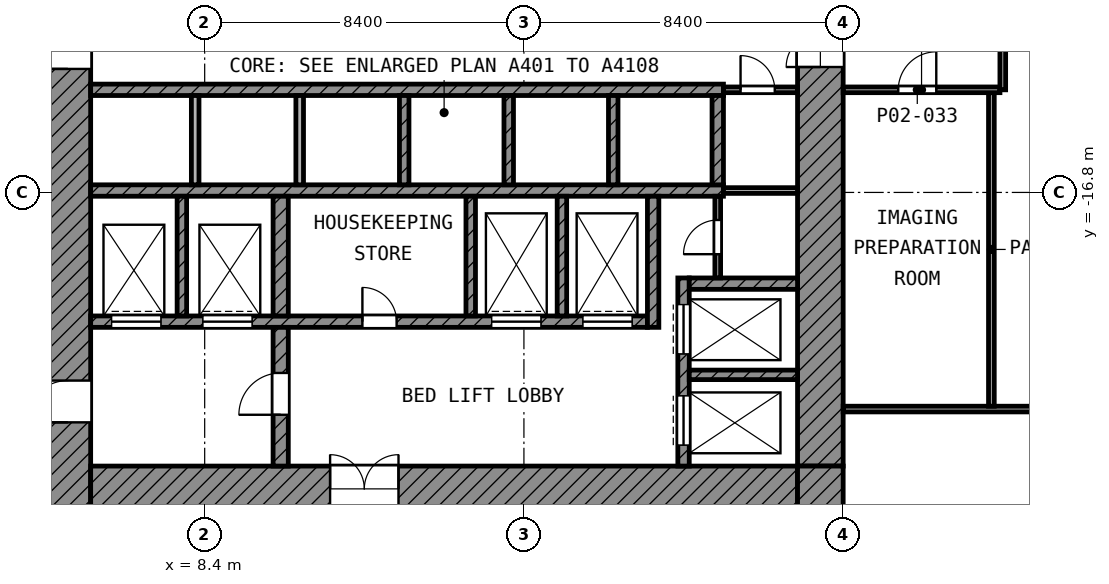
"""IFC4 building model, lengths in metres.
Left out: names, types, materials, properties, quantities, classifications, styles, units other than length and angle.
Written with IfcOpenShell. Run it as: python <this file> out.ifc"""

import sys

from ifc_helpers import new_model, si_unit, direction, frame, frame_2d, origin, place, context, subcontext, project, spatial, rectangle, extrude, element, fill, save


model = new_model("IFC4")
c1 = context("Model", 3, precision=1e-05, world=origin(), true_north=direction((0.0, 1.0)))
c2 = subcontext(c1, "Body", "Model", "MODEL_VIEW")
j1 = project(units=[si_unit("LENGTHUNIT", "METRE"), si_unit("PLANEANGLEUNIT", "RADIAN")], contexts=[c1])
p1 = place(None, origin())
s1 = spatial("IfcSite", under=j1, at=p1, CompositionType="ELEMENT")
p2 = place(p1, origin())
s2 = spatial("IfcBuilding", under=s1, at=p2, CompositionType="ELEMENT")
p3 = place(p2, frame((0.0, 0.0, 7.0)))
s3 = spatial("IfcBuildingStorey", under=s2, at=p3, CompositionType="ELEMENT", Elevation=7.0)
p4 = place(p3, frame((4.8, -25.2, 0.0), z_axis=(0.0, 0.0, 1.0), x_axis=(0.0, 1.0, 0.0)))
e1 = element("IfcWall", 1, at=p4, inside=s3, PredefinedType="SHEAR", context=c2, shape_type="SweptSolid", body=[
    extrude(rectangle(XDim=19.8, YDim=1.2, at=frame_2d((9.9, 0.0))), origin(), (0.0, 0.0, 1.0), 5.25),
])
p5 = place(p4, frame((11.65, 0.0, 0.0)))
e2 = element("IfcOpeningElement", 2, at=p5, cuts=e1, PredefinedType="OPENING", context=c2, shape_type="SweptSolid", body=[
    extrude(rectangle(XDim=1.1, YDim=2.1, at=frame_2d((0.55, 1.05))), frame((0.0, 0.61, 0.0), z_axis=(0.0, -1.0, 0.0), x_axis=(1.0, 0.0, 0.0)), (0.0, 0.0, 1.0), 1.22),
])
p6 = place(p4, frame((2.35, 0.0, 0.0)))
e3 = element("IfcOpeningElement", 3, at=p6, cuts=e1, PredefinedType="OPENING", context=c2, shape_type="SweptSolid", body=[
    extrude(rectangle(XDim=1.1, YDim=2.1, at=frame_2d((0.55, 1.05))), frame((0.0, 0.61, 0.0), z_axis=(0.0, -1.0, 0.0), x_axis=(1.0, 0.0, 0.0)), (0.0, 0.0, 1.0), 1.22),
])
p7 = place(p3, frame((24.6, -24.0, 0.0), z_axis=(0.0, 0.0, 1.0), x_axis=(0.0, 1.0, 0.0)))
e4 = element("IfcWall", 4, at=p7, inside=s3, PredefinedType="SHEAR", context=c2, shape_type="SweptSolid", body=[
    extrude(rectangle(XDim=18.6, YDim=1.2, at=frame_2d((9.3, 0.0))), origin(), (0.0, 0.0, 1.0), 5.25),
])
p8 = place(p7, frame((10.5, 0.0, 0.0)))
e5 = element("IfcOpeningElement", 5, at=p8, cuts=e4, PredefinedType="OPENING", context=c2, shape_type="SweptSolid", body=[
    extrude(rectangle(XDim=1.8, YDim=2.1, at=frame_2d((0.9, 1.05))), frame((0.0, 0.61, 0.0), z_axis=(0.0, -1.0, 0.0), x_axis=(1.0, 0.0, 0.0)), (0.0, 0.0, 1.0), 1.22),
])
p9 = place(p3, frame((5.4, -24.6, 0.0), z_axis=(0.0, 0.0, 1.0), x_axis=(1.0, 0.0, 0.0)))
e6 = element("IfcWall", 6, at=p9, inside=s3, PredefinedType="SHEAR", context=c2, shape_type="SweptSolid", body=[
    extrude(rectangle(XDim=18.6, YDim=1.2, at=frame_2d((9.3, 0.0))), origin(), (0.0, 0.0, 1.0), 5.25),
])
p10 = place(p9, frame((6.3, 0.0, 0.0)))
e7 = element("IfcOpeningElement", 7, at=p10, cuts=e6, PredefinedType="OPENING", context=c2, shape_type="SweptSolid", body=[
    extrude(rectangle(XDim=1.8, YDim=2.1, at=frame_2d((0.9, 1.05))), frame((0.0, 0.61, 0.0), z_axis=(0.0, -1.0, 0.0), x_axis=(1.0, 0.0, 0.0)), (0.0, 0.0, 1.0), 1.22),
])
p11 = place(p3, frame((24.6, -25.2, 0.0), z_axis=(0.0, 0.0, 1.0), x_axis=(0.0, 1.0, 0.0)))
e8 = element("IfcWall", 8, at=p11, inside=s3, PredefinedType="SHEAR", context=c2, shape_type="SweptSolid", body=[
    extrude(rectangle(XDim=1.2, YDim=1.2, at=frame_2d((0.6, 0.0))), origin(), (0.0, 0.0, 1.0), 5.25),
])
for number, where, z_axis, x_axis in (
    (9, (5.4, -14.1, 0.0), (0.0, 0.0, 1.0), (1.0, 0.0, 0.0)),
    (10, (5.4, -16.75, 0.0), (0.0, 0.0, 1.0), (1.0, 0.0, 0.0)),
):
    element("IfcWall", number, at=place(p3, frame(where, z_axis=z_axis, x_axis=x_axis)), inside=s3, PredefinedType="SHEAR", context=c2, shape_type="SweptSolid", body=[
        extrude(rectangle(XDim=16.65, YDim=0.3, at=frame_2d((8.325, 0.0))), origin(), (0.0, 0.0, 1.0), 5.25),
    ])
p12 = place(p3, frame((5.4, -20.2, 0.0), z_axis=(0.0, 0.0, 1.0), x_axis=(1.0, 0.0, 0.0)))
e11 = element("IfcWall", 11, at=p12, inside=s3, PredefinedType="SHEAR", context=c2, shape_type="SweptSolid", body=[
    extrude(rectangle(XDim=14.65, YDim=0.3, at=frame_2d((7.325, 0.0))), origin(), (0.0, 0.0, 1.0), 5.25),
])
p13 = place(p12, frame((10.55, 0.0, 0.0)))
e12 = element("IfcOpeningElement", 12, at=p13, cuts=e11, PredefinedType="OPENING", context=c2, shape_type="SweptSolid", body=[
    extrude(rectangle(XDim=1.3, YDim=2.1, at=frame_2d((0.65, 1.05))), frame((0.0, 0.16, 0.0), z_axis=(0.0, -1.0, 0.0), x_axis=(1.0, 0.0, 0.0)), (0.0, 0.0, 1.0), 0.32),
])
p14 = place(p12, frame((12.95, 0.0, 0.0)))
e13 = element("IfcOpeningElement", 13, at=p14, cuts=e11, PredefinedType="OPENING", context=c2, shape_type="SweptSolid", body=[
    extrude(rectangle(XDim=1.3, YDim=2.1, at=frame_2d((0.65, 1.05))), frame((0.0, 0.16, 0.0), z_axis=(0.0, -1.0, 0.0), x_axis=(1.0, 0.0, 0.0)), (0.0, 0.0, 1.0), 0.32),
])
p15 = place(p12, frame((0.55, 0.0, 0.0)))
e14 = element("IfcOpeningElement", 14, at=p15, cuts=e11, PredefinedType="OPENING", context=c2, shape_type="SweptSolid", body=[
    extrude(rectangle(XDim=1.3, YDim=2.1, at=frame_2d((0.65, 1.05))), frame((0.0, 0.16, 0.0), z_axis=(0.0, -1.0, 0.0), x_axis=(1.0, 0.0, 0.0)), (0.0, 0.0, 1.0), 0.32),
])
p16 = place(p12, frame((2.95, 0.0, 0.0)))
e15 = element("IfcOpeningElement", 15, at=p16, cuts=e11, PredefinedType="OPENING", context=c2, shape_type="SweptSolid", body=[
    extrude(rectangle(XDim=1.3, YDim=2.1, at=frame_2d((0.65, 1.05))), frame((0.0, 0.16, 0.0), z_axis=(0.0, -1.0, 0.0), x_axis=(1.0, 0.0, 0.0)), (0.0, 0.0, 1.0), 0.32),
])
p17 = place(p12, frame((7.15, 0.0, 0.0)))
e16 = element("IfcOpeningElement", 16, at=p17, cuts=e11, PredefinedType="OPENING", context=c2, shape_type="SweptSolid", body=[
    extrude(rectangle(XDim=0.9, YDim=2.1, at=frame_2d((0.45, 1.05))), frame((0.0, 0.16, 0.0), z_axis=(0.0, -1.0, 0.0), x_axis=(1.0, 0.0, 0.0)), (0.0, 0.0, 1.0), 0.32),
])
p18 = place(p3, frame((10.4, -24.0, 0.0), z_axis=(0.0, 0.0, 1.0), x_axis=(0.0, 1.0, 0.0)))
e17 = element("IfcWall", 17, at=p18, inside=s3, PredefinedType="SHEAR", context=c2, shape_type="SweptSolid", body=[
    extrude(rectangle(XDim=3.65, YDim=0.4, at=frame_2d((1.825, 0.0))), origin(), (0.0, 0.0, 1.0), 5.25),
])
p19 = place(p18, frame((1.35, 0.0, 0.0)))
e18 = element("IfcOpeningElement", 18, at=p19, cuts=e17, PredefinedType="OPENING", context=c2, shape_type="SweptSolid", body=[
    extrude(rectangle(XDim=1.1, YDim=2.1, at=frame_2d((0.55, 1.05))), frame((0.0, 0.21, 0.0), z_axis=(0.0, -1.0, 0.0), x_axis=(1.0, 0.0, 0.0)), (0.0, 0.0, 1.0), 0.42),
])
p20 = place(p3, frame((10.4, -20.05, 0.0), z_axis=(0.0, 0.0, 1.0), x_axis=(0.0, 1.0, 0.0)))
e19 = element("IfcWall", 19, at=p20, inside=s3, PredefinedType="SHEAR", context=c2, shape_type="SweptSolid", body=[
    extrude(rectangle(XDim=3.15, YDim=0.4, at=frame_2d((1.575, 0.0))), origin(), (0.0, 0.0, 1.0), 5.25),
])
p21 = place(p3, frame((20.2, -20.35, 0.0), z_axis=(0.0, 0.0, 1.0), x_axis=(0.0, 1.0, 0.0)))
e20 = element("IfcWall", 20, at=p21, inside=s3, PredefinedType="SHEAR", context=c2, shape_type="SweptSolid", body=[
    extrude(rectangle(XDim=3.45, YDim=0.3, at=frame_2d((1.725, 0.0))), origin(), (0.0, 0.0, 1.0), 5.25),
])
p22 = place(p3, frame((21.9, -16.6, 0.0), z_axis=(0.0, 0.0, 1.0), x_axis=(0.0, 1.0, 0.0)))
e21 = element("IfcWall", 21, at=p22, inside=s3, PredefinedType="SHEAR", context=c2, shape_type="SweptSolid", body=[
    extrude(rectangle(XDim=2.35, YDim=0.3, at=frame_2d((1.175, 0.0))), origin(), (0.0, 0.0, 1.0), 5.25),
])
p23 = place(p3, frame((21.15, -19.2, 0.0), z_axis=(0.0, 0.0, 1.0), x_axis=(1.0, 0.0, 0.0)))
e22 = element("IfcWall", 22, at=p23, inside=s3, PredefinedType="SHEAR", context=c2, shape_type="SweptSolid", body=[
    extrude(rectangle(XDim=2.85, YDim=0.3, at=frame_2d((1.425, 0.0))), origin(), (0.0, 0.0, 1.0), 5.25),
])
p24 = place(p3, frame((21.0, -24.0, 0.0), z_axis=(0.0, 0.0, 1.0), x_axis=(0.0, 1.0, 0.0)))
e23 = element("IfcWall", 23, at=p24, inside=s3, PredefinedType="SHEAR", context=c2, shape_type="SweptSolid", body=[
    extrude(rectangle(XDim=4.95, YDim=0.3, at=frame_2d((2.475, 0.0))), origin(), (0.0, 0.0, 1.0), 5.25),
])
p25 = place(p24, frame((2.95, 0.0, 0.0)))
e24 = element("IfcOpeningElement", 24, at=p25, cuts=e23, PredefinedType="OPENING", context=c2, shape_type="SweptSolid", body=[
    extrude(rectangle(XDim=1.3, YDim=2.1, at=frame_2d((0.65, 1.05))), frame((0.0, 0.16, 0.0), z_axis=(0.0, -1.0, 0.0), x_axis=(1.0, 0.0, 0.0)), (0.0, 0.0, 1.0), 0.32),
])
p26 = place(p24, frame((0.55, 0.0, 0.0)))
e25 = element("IfcOpeningElement", 25, at=p26, cuts=e23, PredefinedType="OPENING", context=c2, shape_type="SweptSolid", body=[
    extrude(rectangle(XDim=1.3, YDim=2.1, at=frame_2d((0.65, 1.05))), frame((0.0, 0.16, 0.0), z_axis=(0.0, -1.0, 0.0), x_axis=(1.0, 0.0, 0.0)), (0.0, 0.0, 1.0), 0.32),
])
p27 = place(p3, frame((21.15, -21.6, 0.0), z_axis=(0.0, 0.0, 1.0), x_axis=(1.0, 0.0, 0.0)))
e26 = element("IfcWall", 26, at=p27, inside=s3, PredefinedType="SHEAR", context=c2, shape_type="SweptSolid", body=[
    extrude(rectangle(XDim=2.85, YDim=0.25, at=frame_2d((1.425, 0.0))), origin(), (0.0, 0.0, 1.0), 5.25),
])
for number, where, z_axis, x_axis in (
    (27, (7.8, -20.05, 0.0), (0.0, 0.0, 1.0), (0.0, 1.0, 0.0)),
    (28, (15.4, -20.05, 0.0), (0.0, 0.0, 1.0), (0.0, 1.0, 0.0)),
    (29, (17.8, -20.05, 0.0), (0.0, 0.0, 1.0), (0.0, 1.0, 0.0)),
):
    element("IfcWall", number, at=place(p3, frame(where, z_axis=z_axis, x_axis=x_axis)), inside=s3, PredefinedType="SHEAR", context=c2, shape_type="SweptSolid", body=[
        extrude(rectangle(XDim=3.15, YDim=0.25, at=frame_2d((1.575, 0.0))), origin(), (0.0, 0.0, 1.0), 5.25),
    ])
for number, where, z_axis, x_axis in (
    (30, (8.15, -16.6, 0.0), (0.0, 0.0, 1.0), (0.0, 1.0, 0.0)),
    (31, (10.9, -16.6, 0.0), (0.0, 0.0, 1.0), (0.0, 1.0, 0.0)),
):
    element("IfcWall", number, at=place(p3, frame(where, z_axis=z_axis, x_axis=x_axis)), inside=s3, PredefinedType="PARTITIONING", context=c2, shape_type="SweptSolid", body=[
        extrude(rectangle(XDim=2.35, YDim=0.2, at=frame_2d((1.175, 0.0))), origin(), (0.0, 0.0, 1.0), 5.25),
    ])
for number, where, z_axis, x_axis in (
    (32, (13.65, -16.6, 0.0), (0.0, 0.0, 1.0), (0.0, 1.0, 0.0)),
    (33, (16.4, -16.6, 0.0), (0.0, 0.0, 1.0), (0.0, 1.0, 0.0)),
    (34, (19.15, -16.6, 0.0), (0.0, 0.0, 1.0), (0.0, 1.0, 0.0)),
):
    element("IfcWall", number, at=place(p3, frame(where, z_axis=z_axis, x_axis=x_axis)), inside=s3, PredefinedType="SHEAR", context=c2, shape_type="SweptSolid", body=[
        extrude(rectangle(XDim=2.35, YDim=0.25, at=frame_2d((1.175, 0.0))), origin(), (0.0, 0.0, 1.0), 5.25),
    ])
p28 = place(p3, frame((21.9, -19.05, 0.0), z_axis=(0.0, 0.0, 1.0), x_axis=(0.0, 1.0, 0.0)))
e35 = element("IfcWall", 35, at=p28, inside=s3, PredefinedType="PARTITIONING", context=c2, shape_type="SweptSolid", body=[
    extrude(rectangle(XDim=2.15, YDim=0.15, at=frame_2d((1.075, 0.0))), origin(), (0.0, 0.0, 1.0), 5.25),
])
p29 = place(p28, frame((0.625, 0.0, 0.0)))
e36 = element("IfcOpeningElement", 36, at=p29, cuts=e35, PredefinedType="OPENING", context=c2, shape_type="SweptSolid", body=[
    extrude(rectangle(XDim=0.9, YDim=2.1, at=frame_2d((0.45, 1.05))), frame((0.0, 0.085, 0.0), z_axis=(0.0, -1.0, 0.0), x_axis=(1.0, 0.0, 0.0)), (0.0, 0.0, 1.0), 0.17),
])
p30 = place(p3, frame((22.05, -16.75, 0.0), z_axis=(0.0, 0.0, 1.0), x_axis=(1.0, 0.0, 0.0)))
e37 = element("IfcWall", 37, at=p30, inside=s3, PredefinedType="PARTITIONING", context=c2, shape_type="SweptSolid", body=[
    extrude(rectangle(XDim=1.95, YDim=0.15, at=frame_2d((0.975, 0.0))), origin(), (0.0, 0.0, 1.0), 5.25),
])
p31 = place(p3, frame((22.05, -14.1, 0.0), z_axis=(0.0, 0.0, 1.0), x_axis=(1.0, 0.0, 0.0)))
e38 = element("IfcWall", 38, at=p31, inside=s3, PredefinedType="PARTITIONING", context=c2, shape_type="SweptSolid", body=[
    extrude(rectangle(XDim=1.95, YDim=0.15, at=frame_2d((0.975, 0.0))), origin(), (0.0, 0.0, 1.0), 5.25),
])
p32 = place(p31, frame((0.45, 0.0, 0.0)))
e39 = element("IfcOpeningElement", 39, at=p32, cuts=e38, PredefinedType="OPENING", context=c2, shape_type="SweptSolid", body=[
    extrude(rectangle(XDim=0.9, YDim=2.1, at=frame_2d((0.45, 1.05))), frame((0.0, 0.085, 0.0), z_axis=(0.0, -1.0, 0.0), x_axis=(1.0, 0.0, 0.0)), (0.0, 0.0, 1.0), 0.17),
])
p33 = place(p3, frame((25.2, -22.5, 0.0), z_axis=(0.0, 0.0, 1.0), x_axis=(1.0, 0.0, 0.0)))
e40 = element("IfcWall", 40, at=p33, inside=s3, PredefinedType="PARTITIONING", context=c2, shape_type="SweptSolid", body=[
    extrude(rectangle(XDim=29.625, YDim=0.15, at=frame_2d((14.812, 0.0))), origin(), (0.0, 0.0, 1.0), 5.25),
])
p34 = place(p33, frame((5.65, 0.0, 0.0)))
e41 = element("IfcOpeningElement", 41, at=p34, cuts=e40, PredefinedType="OPENING", context=c2, shape_type="SweptSolid", body=[
    extrude(rectangle(XDim=1.0, YDim=2.1, at=frame_2d((0.5, 1.05))), frame((0.0, 0.085, 0.0), z_axis=(0.0, -1.0, 0.0), x_axis=(1.0, 0.0, 0.0)), (0.0, 0.0, 1.0), 0.17),
])
p35 = place(p33, frame((10.45, 0.0, 0.0)))
e42 = element("IfcOpeningElement", 42, at=p35, cuts=e40, PredefinedType="OPENING", context=c2, shape_type="SweptSolid", body=[
    extrude(rectangle(XDim=1.5, YDim=2.1, at=frame_2d((0.75, 1.05))), frame((0.0, 0.085, 0.0), z_axis=(0.0, -1.0, 0.0), x_axis=(1.0, 0.0, 0.0)), (0.0, 0.0, 1.0), 0.17),
])
p36 = place(p33, frame((13.25, 0.0, 0.0)))
e43 = element("IfcOpeningElement", 43, at=p36, cuts=e40, PredefinedType="OPENING", context=c2, shape_type="SweptSolid", body=[
    extrude(rectangle(XDim=1.5, YDim=2.1, at=frame_2d((0.75, 1.05))), frame((0.0, 0.085, 0.0), z_axis=(0.0, -1.0, 0.0), x_axis=(1.0, 0.0, 0.0)), (0.0, 0.0, 1.0), 0.17),
])
p37 = place(p3, frame((25.2, -14.1, 0.0), z_axis=(0.0, 0.0, 1.0), x_axis=(1.0, 0.0, 0.0)))
e44 = element("IfcWall", 44, at=p37, inside=s3, PredefinedType="PARTITIONING", context=c2, shape_type="SweptSolid", body=[
    extrude(rectangle(XDim=4.125, YDim=0.15, at=frame_2d((2.062, 0.0))), origin(), (0.0, 0.0, 1.0), 5.25),
])
p38 = place(p37, frame((1.45, 0.0, 0.0)))
e45 = element("IfcOpeningElement", 45, at=p38, cuts=e44, PredefinedType="OPENING", context=c2, shape_type="SweptSolid", body=[
    extrude(rectangle(XDim=1.0, YDim=2.1, at=frame_2d((0.5, 1.05))), frame((0.0, 0.085, 0.0), z_axis=(0.0, -1.0, 0.0), x_axis=(1.0, 0.0, 0.0)), (0.0, 0.0, 1.0), 0.17),
])
p39 = place(p3, frame((29.1, -22.425, 0.0), z_axis=(0.0, 0.0, 1.0), x_axis=(0.0, 1.0, 0.0)))
e46 = element("IfcWall", 46, at=p39, inside=s3, PredefinedType="PARTITIONING", context=c2, shape_type="SweptSolid", body=[
    extrude(rectangle(XDim=8.25, YDim=0.15, at=frame_2d((4.125, 0.0))), origin(), (0.0, 0.0, 1.0), 5.25),
])
p40 = place(p3, frame((29.4, -14.1, 0.0), z_axis=(0.0, 0.0, 1.0), x_axis=(0.0, 1.0, 0.0)))
e47 = element("IfcWall", 47, at=p40, inside=s3, PredefinedType="PARTITIONING", context=c2, shape_type="SweptSolid", body=[
    extrude(rectangle(XDim=3.0, YDim=0.15, at=frame_2d((1.5, 0.0))), origin(), (0.0, 0.0, 1.0), 5.25),
])
p41 = place(p25, origin())
e48 = element("IfcDoor", 48, at=p41, inside=s3, OperationType="DOUBLE_DOOR_SLIDING", PredefinedType="DOOR", context=c2, shape_type="SweptSolid", body=[
    extrude(rectangle(XDim=1.3, YDim=2.1, at=frame_2d((0.65, 1.05))), frame((0.0, 0.025, 0.0), z_axis=(0.0, -1.0, 0.0), x_axis=(1.0, 0.0, 0.0)), (0.0, 0.0, 1.0), 0.05),
])
fill(e24, e48)
p42 = place(p26, origin())
e49 = element("IfcDoor", 49, at=p42, inside=s3, OperationType="DOUBLE_DOOR_SLIDING", PredefinedType="DOOR", context=c2, shape_type="SweptSolid", body=[
    extrude(rectangle(XDim=1.3, YDim=2.1, at=frame_2d((0.65, 1.05))), frame((0.0, 0.025, 0.0), z_axis=(0.0, -1.0, 0.0), x_axis=(1.0, 0.0, 0.0)), (0.0, 0.0, 1.0), 0.05),
])
fill(e25, e49)
p43 = place(p13, origin())
e50 = element("IfcDoor", 50, at=p43, inside=s3, OperationType="DOUBLE_DOOR_SLIDING", PredefinedType="DOOR", context=c2, shape_type="SweptSolid", body=[
    extrude(rectangle(XDim=1.3, YDim=2.1, at=frame_2d((0.65, 1.05))), frame((0.0, 0.025, 0.0), z_axis=(0.0, -1.0, 0.0), x_axis=(1.0, 0.0, 0.0)), (0.0, 0.0, 1.0), 0.05),
])
fill(e12, e50)
p44 = place(p14, origin())
e51 = element("IfcDoor", 51, at=p44, inside=s3, OperationType="DOUBLE_DOOR_SLIDING", PredefinedType="DOOR", context=c2, shape_type="SweptSolid", body=[
    extrude(rectangle(XDim=1.3, YDim=2.1, at=frame_2d((0.65, 1.05))), frame((0.0, 0.025, 0.0), z_axis=(0.0, -1.0, 0.0), x_axis=(1.0, 0.0, 0.0)), (0.0, 0.0, 1.0), 0.05),
])
fill(e13, e51)
p45 = place(p15, origin())
e52 = element("IfcDoor", 52, at=p45, inside=s3, OperationType="DOUBLE_DOOR_SLIDING", PredefinedType="DOOR", context=c2, shape_type="SweptSolid", body=[
    extrude(rectangle(XDim=1.3, YDim=2.1, at=frame_2d((0.65, 1.05))), frame((0.0, 0.025, 0.0), z_axis=(0.0, -1.0, 0.0), x_axis=(1.0, 0.0, 0.0)), (0.0, 0.0, 1.0), 0.05),
])
fill(e14, e52)
p46 = place(p16, origin())
e53 = element("IfcDoor", 53, at=p46, inside=s3, OperationType="DOUBLE_DOOR_SLIDING", PredefinedType="DOOR", context=c2, shape_type="SweptSolid", body=[
    extrude(rectangle(XDim=1.3, YDim=2.1, at=frame_2d((0.65, 1.05))), frame((0.0, 0.025, 0.0), z_axis=(0.0, -1.0, 0.0), x_axis=(1.0, 0.0, 0.0)), (0.0, 0.0, 1.0), 0.05),
])
fill(e15, e53)
p47 = place(p5, origin())
e54 = element("IfcDoor", 54, at=p47, inside=s3, OperationType="SINGLE_SWING_LEFT", PredefinedType="DOOR", context=c2, shape_type="SweptSolid", body=[
    extrude(rectangle(XDim=1.1, YDim=2.1, at=frame_2d((0.55, 1.05))), frame((0.0, 0.025, 0.0), z_axis=(0.0, -1.0, 0.0), x_axis=(1.0, 0.0, 0.0)), (0.0, 0.0, 1.0), 0.05),
])
fill(e2, e54)
p48 = place(p6, origin())
e55 = element("IfcDoor", 55, at=p48, inside=s3, OperationType="SINGLE_SWING_LEFT", PredefinedType="DOOR", context=c2, shape_type="SweptSolid", body=[
    extrude(rectangle(XDim=1.1, YDim=2.1, at=frame_2d((0.55, 1.05))), frame((0.0, 0.025, 0.0), z_axis=(0.0, -1.0, 0.0), x_axis=(1.0, 0.0, 0.0)), (0.0, 0.0, 1.0), 0.05),
])
fill(e3, e55)
p49 = place(p19, origin())
e56 = element("IfcDoor", 56, at=p49, inside=s3, OperationType="SINGLE_SWING_LEFT", PredefinedType="DOOR", context=c2, shape_type="SweptSolid", body=[
    extrude(rectangle(XDim=1.1, YDim=2.1, at=frame_2d((0.55, 1.05))), frame((0.0, 0.025, 0.0), z_axis=(0.0, -1.0, 0.0), x_axis=(1.0, 0.0, 0.0)), (0.0, 0.0, 1.0), 0.05),
])
fill(e18, e56)
p50 = place(p8, origin())
e57 = element("IfcDoor", 57, at=p50, inside=s3, OperationType="DOUBLE_DOOR_SINGLE_SWING", PredefinedType="DOOR", context=c2, shape_type="SweptSolid", body=[
    extrude(rectangle(XDim=1.8, YDim=2.1, at=frame_2d((0.9, 1.05))), frame((0.0, 0.025, 0.0), z_axis=(0.0, -1.0, 0.0), x_axis=(1.0, 0.0, 0.0)), (0.0, 0.0, 1.0), 0.05),
])
fill(e5, e57)
p51 = place(p10, origin())
e58 = element("IfcDoor", 58, at=p51, inside=s3, OperationType="DOUBLE_DOOR_SINGLE_SWING", PredefinedType="DOOR", context=c2, shape_type="SweptSolid", body=[
    extrude(rectangle(XDim=1.8, YDim=2.1, at=frame_2d((0.9, 1.05))), frame((0.0, 0.025, 0.0), z_axis=(0.0, -1.0, 0.0), x_axis=(1.0, 0.0, 0.0)), (0.0, 0.0, 1.0), 0.05),
])
fill(e7, e58)
p52 = place(p32, origin())
e59 = element("IfcDoor", 59, at=p52, inside=s3, OperationType="SINGLE_SWING_LEFT", PredefinedType="DOOR", context=c2, shape_type="SweptSolid", body=[
    extrude(rectangle(XDim=0.9, YDim=2.1, at=frame_2d((0.45, 1.05))), frame((0.0, 0.025, 0.0), z_axis=(0.0, -1.0, 0.0), x_axis=(1.0, 0.0, 0.0)), (0.0, 0.0, 1.0), 0.05),
])
fill(e39, e59)
p53 = place(p29, origin())
e60 = element("IfcDoor", 60, at=p53, inside=s3, OperationType="SINGLE_SWING_LEFT", PredefinedType="DOOR", context=c2, shape_type="SweptSolid", body=[
    extrude(rectangle(XDim=0.9, YDim=2.1, at=frame_2d((0.45, 1.05))), frame((0.0, 0.025, 0.0), z_axis=(0.0, -1.0, 0.0), x_axis=(1.0, 0.0, 0.0)), (0.0, 0.0, 1.0), 0.05),
])
fill(e36, e60)
p54 = place(p17, origin())
e61 = element("IfcDoor", 61, at=p54, inside=s3, OperationType="SINGLE_SWING_LEFT", PredefinedType="DOOR", context=c2, shape_type="SweptSolid", body=[
    extrude(rectangle(XDim=0.9, YDim=2.1, at=frame_2d((0.45, 1.05))), frame((0.0, 0.025, 0.0), z_axis=(0.0, -1.0, 0.0), x_axis=(1.0, 0.0, 0.0)), (0.0, 0.0, 1.0), 0.05),
])
fill(e16, e61)
p55 = place(p38, origin())
e62 = element("IfcDoor", 62, at=p55, inside=s3, OperationType="SINGLE_SWING_RIGHT", PredefinedType="DOOR", context=c2, shape_type="SweptSolid", body=[
    extrude(rectangle(XDim=1.0, YDim=2.1, at=frame_2d((0.5, 1.05))), frame((0.0, 0.025, 0.0), z_axis=(0.0, -1.0, 0.0), x_axis=(1.0, 0.0, 0.0)), (0.0, 0.0, 1.0), 0.05),
])
fill(e45, e62)
save(model, sys.argv[1])
